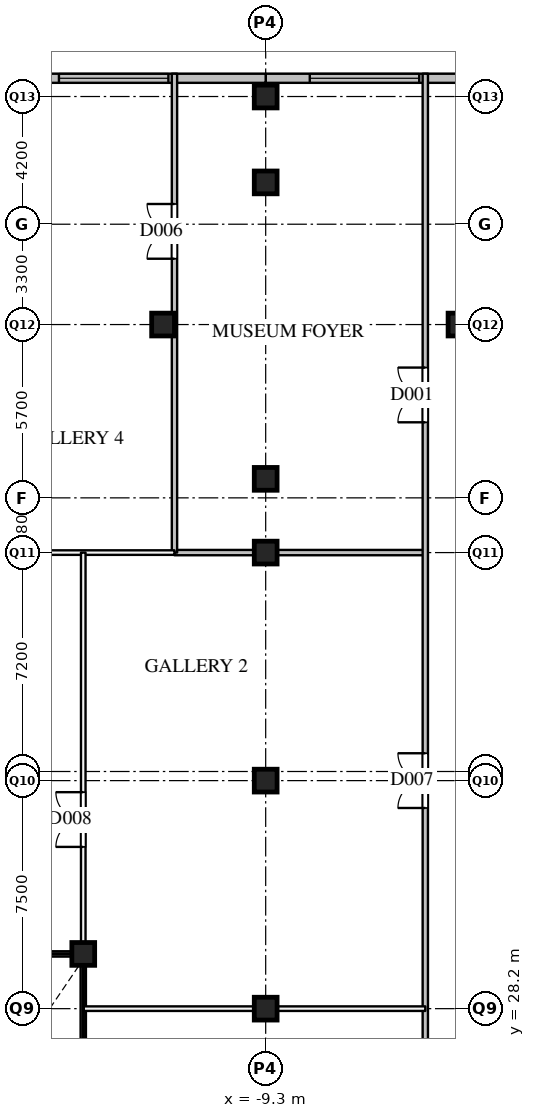
"""IFC4 building model, lengths in metres.
Left out: names, types, materials, properties, quantities, classifications, styles, units other than length and angle.
Written with IfcOpenShell. Run it as: python <this file> out.ifc"""

import sys

from ifc_helpers import new_model, si_unit, direction, frame, frame_2d, origin, origin_2d, place, context, subcontext, project, spatial, rectangle, extrude, element, fill, save


model = new_model("IFC4")
c1 = context("Model", 3, precision=1e-05, world=origin(), true_north=direction((0.0, 1.0)))
c2 = subcontext(c1, "Body", "Model", "MODEL_VIEW")
j1 = project(units=[si_unit("LENGTHUNIT", "METRE"), si_unit("PLANEANGLEUNIT", "RADIAN")], contexts=[c1])
p1 = place(None, origin())
s1 = spatial("IfcSite", under=j1, at=p1, CompositionType="ELEMENT")
p2 = place(p1, origin())
s2 = spatial("IfcBuilding", under=s1, at=p2, CompositionType="ELEMENT")
p3 = place(p2, origin())
s3 = spatial("IfcBuildingStorey", under=s2, at=p3, CompositionType="ELEMENT", Elevation=0.0)
for number, where, z_axis, x_axis in (
    (1, (-9.3, 28.2, 0.0), (0.0, 0.0, 1.0), (1.0, 0.0, 0.0)),
    (2, (-9.3, 35.7, 0.0), (0.0, 0.0, 1.0), (1.0, 0.0, 0.0)),
    (3, (-9.3, 43.2, 0.0), (0.0, 0.0, 1.0), (1.0, 0.0, 0.0)),
    (4, (-9.3, 58.2, 0.0), (0.0, 0.0, 1.0), (1.0, 0.0, 0.0)),
    (5, (-15.3, 30.0, 0.0), (0.0, 0.0, 1.0), (1.0, 0.0, 0.0)),
    (6, (-12.675, 50.7, 0.0), (0.0, 0.0, 1.0), (1.0, 0.0, 0.0)),
    (7, (-9.3, 45.625, 0.0), (0.0, 0.0, 1.0), (1.0, 0.0, 0.0)),
    (8, (-9.3, 55.375, 0.0), (0.0, 0.0, 1.0), (1.0, 0.0, 0.0)),
    (9, (-2.925, 50.7, 0.0), (0.0, 0.0, 1.0), (1.0, 0.0, 0.0)),
):
    element("IfcColumn", number, at=place(p3, frame(where, z_axis=z_axis, x_axis=x_axis)), inside=s3, PredefinedType="COLUMN", context=c2, shape_type="SweptSolid", body=[
        extrude(rectangle(XDim=0.75, YDim=0.75, at=origin_2d()), origin(), (0.0, 0.0, 1.0), 8.0),
    ])
p4 = place(p3, frame((-1.8, 58.8, 0.0), z_axis=(0.0, 0.0, 1.0), x_axis=(-1.0, 0.0, 0.0)))
e10 = element("IfcWall", 10, at=p4, inside=s3, PredefinedType="SOLIDWALL", context=c2, shape_type="SweptSolid", body=[
    extrude(rectangle(XDim=7.5, YDim=0.3, at=frame_2d((3.75, 0.0))), origin(), (0.0, 0.0, 1.0), 7.59),
])
p5 = place(p4, frame((2.45, 0.0, 0.9)))
e11 = element("IfcOpeningElement", 11, at=p5, cuts=e10, PredefinedType="OPENING", context=c2, shape_type="SweptSolid", body=[
    extrude(rectangle(XDim=3.6, YDim=3.0, at=frame_2d((1.8, 1.5))), frame((0.0, 0.16, 0.0), z_axis=(0.0, -1.0, 0.0), x_axis=(1.0, 0.0, 0.0)), (0.0, 0.0, 1.0), 0.32),
])
p6 = place(p3, frame((-9.3, 58.8, 0.0), z_axis=(0.0, 0.0, 1.0), x_axis=(-1.0, 0.0, 0.0)))
e12 = element("IfcWall", 12, at=p6, inside=s3, PredefinedType="SOLIDWALL", context=c2, shape_type="SweptSolid", body=[
    extrude(rectangle(XDim=7.5, YDim=0.3, at=frame_2d((3.75, 0.0))), origin(), (0.0, 0.0, 1.0), 7.59),
])
p7 = place(p6, frame((3.2, 0.0, 0.9)))
e13 = element("IfcOpeningElement", 13, at=p7, cuts=e12, PredefinedType="OPENING", context=c2, shape_type="SweptSolid", body=[
    extrude(rectangle(XDim=3.6, YDim=3.0, at=frame_2d((1.8, 1.5))), frame((0.0, 0.16, 0.0), z_axis=(0.0, -1.0, 0.0), x_axis=(1.0, 0.0, 0.0)), (0.0, 0.0, 1.0), 0.32),
])
p8 = place(p3, frame((-27.3, 30.0, 0.0), z_axis=(0.0, 0.0, 1.0), x_axis=(1.0, 0.0, 0.0)))
e14 = element("IfcWall", 14, at=p8, inside=s3, PredefinedType="PARTITIONING", context=c2, shape_type="SweptSolid", body=[
    extrude(rectangle(XDim=12.0, YDim=0.175, at=frame_2d((6.0, 0.0))), origin(), (0.0, 0.0, 1.0), 7.59),
])
p9 = place(p3, frame((-12.3, 43.2, 0.0), z_axis=(0.0, 0.0, 1.0), x_axis=(1.0, 0.0, 0.0)))
e15 = element("IfcWall", 15, at=p9, inside=s3, PredefinedType="PARTITIONING", context=c2, shape_type="SweptSolid", body=[
    extrude(rectangle(XDim=8.25, YDim=0.175, at=frame_2d((4.125, 0.0))), origin(), (0.0, 0.0, 1.0), 6.79),
])
p10 = place(p3, frame((-15.3, 12.0, 0.0), z_axis=(0.0, 0.0, 1.0), x_axis=(0.0, 1.0, 0.0)))
e16 = element("IfcWall", 16, at=p10, inside=s3, PredefinedType="PARTITIONING", context=c2, shape_type="SweptSolid", body=[
    extrude(rectangle(XDim=18.0, YDim=0.175, at=frame_2d((9.0, 0.0))), origin(), (0.0, 0.0, 1.0), 7.59),
])
p11 = place(p3, frame((-12.3, 43.2, 0.0), z_axis=(0.0, 0.0, 1.0), x_axis=(0.0, 1.0, 0.0)))
e17 = element("IfcWall", 17, at=p11, inside=s3, PredefinedType="PARTITIONING", context=c2, shape_type="SweptSolid", body=[
    extrude(rectangle(XDim=15.75, YDim=0.175, at=frame_2d((7.875, 0.0))), origin(), (0.0, 0.0, 1.0), 6.79),
])
p12 = place(p11, frame((9.665, 0.0, 0.0)))
e18 = element("IfcOpeningElement", 18, at=p12, cuts=e17, PredefinedType="OPENING", context=c2, shape_type="SweptSolid", body=[
    extrude(rectangle(XDim=1.8, YDim=2.1, at=frame_2d((0.9, 1.05))), frame((0.0, 0.097, 0.0), z_axis=(0.0, -1.0, 0.0), x_axis=(1.0, 0.0, 0.0)), (0.0, 0.0, 1.0), 0.195),
])
p13 = place(p3, frame((-4.05, -4.05, 0.0), z_axis=(0.0, 0.0, 1.0), x_axis=(0.0, 1.0, 0.0)))
e19 = element("IfcWall", 19, at=p13, inside=s3, PredefinedType="PARTITIONING", context=c2, shape_type="SweptSolid", body=[
    extrude(rectangle(XDim=63.0, YDim=0.175, at=frame_2d((31.5, 0.0))), origin(), (0.0, 0.0, 1.0), 6.79),
])
p14 = place(p13, frame((51.535, 0.0, 0.0)))
e20 = element("IfcOpeningElement", 20, at=p14, cuts=e19, PredefinedType="OPENING", context=c2, shape_type="SweptSolid", body=[
    extrude(rectangle(XDim=1.8, YDim=2.1, at=frame_2d((0.9, 1.05))), frame((0.0, 0.097, 0.0), z_axis=(0.0, -1.0, 0.0), x_axis=(1.0, 0.0, 0.0)), (0.0, 0.0, 1.0), 0.195),
])
p15 = place(p13, frame((23.25, 0.0, 0.0)))
e21 = element("IfcOpeningElement", 21, at=p15, cuts=e19, PredefinedType="OPENING", context=c2, shape_type="SweptSolid", body=[
    extrude(rectangle(XDim=1.8, YDim=2.1, at=frame_2d((0.9, 1.05))), frame((0.0, 0.097, 0.0), z_axis=(0.0, -1.0, 0.0), x_axis=(1.0, 0.0, 0.0)), (0.0, 0.0, 1.0), 0.195),
])
p16 = place(p13, frame((38.85, 0.0, 0.0)))
e22 = element("IfcOpeningElement", 22, at=p16, cuts=e19, PredefinedType="OPENING", context=c2, shape_type="SweptSolid", body=[
    extrude(rectangle(XDim=1.8, YDim=2.1, at=frame_2d((0.9, 1.05))), frame((0.0, 0.097, 0.0), z_axis=(0.0, -1.0, 0.0), x_axis=(1.0, 0.0, 0.0)), (0.0, 0.0, 1.0), 0.195),
])
p17 = place(p13, frame((8.625, 0.0, 0.0)))
e23 = element("IfcOpeningElement", 23, at=p17, cuts=e19, PredefinedType="OPENING", context=c2, shape_type="SweptSolid", body=[
    extrude(rectangle(XDim=1.8, YDim=2.1, at=frame_2d((0.9, 1.05))), frame((0.0, 0.097, 0.0), z_axis=(0.0, -1.0, 0.0), x_axis=(1.0, 0.0, 0.0)), (0.0, 0.0, 1.0), 0.195),
])
p18 = place(p3, frame((-15.3, 28.2, 0.0), z_axis=(0.0, 0.0, 1.0), x_axis=(1.0, 0.0, 0.0)))
e24 = element("IfcWall", 24, at=p18, inside=s3, PredefinedType="PARTITIONING", context=c2, shape_type="SweptSolid", body=[
    extrude(rectangle(XDim=11.25, YDim=0.15, at=frame_2d((5.625, 0.0))), origin(), (0.0, 0.0, 1.0), 6.79),
])
p19 = place(p3, frame((-27.3, 43.2, 0.0), z_axis=(0.0, 0.0, 1.0), x_axis=(1.0, 0.0, 0.0)))
e25 = element("IfcWall", 25, at=p19, inside=s3, PredefinedType="PARTITIONING", context=c2, shape_type="SweptSolid", body=[
    extrude(rectangle(XDim=15.0, YDim=0.15, at=frame_2d((7.5, 0.0))), origin(), (0.0, 0.0, 1.0), 6.79),
])
p20 = place(p3, frame((-15.3, 30.0, 0.0), z_axis=(0.0, 0.0, 1.0), x_axis=(0.0, 1.0, 0.0)))
e26 = element("IfcWall", 26, at=p20, inside=s3, PredefinedType="PARTITIONING", context=c2, shape_type="SweptSolid", body=[
    extrude(rectangle(XDim=13.2, YDim=0.15, at=frame_2d((6.6, 0.0))), origin(), (0.0, 0.0, 1.0), 6.79),
])
p21 = place(p20, frame((3.52, 0.0, 0.0)))
e27 = element("IfcOpeningElement", 27, at=p21, cuts=e26, PredefinedType="OPENING", context=c2, shape_type="SweptSolid", body=[
    extrude(rectangle(XDim=1.8, YDim=2.1, at=frame_2d((0.9, 1.05))), frame((0.0, 0.085, 0.0), z_axis=(0.0, -1.0, 0.0), x_axis=(1.0, 0.0, 0.0)), (0.0, 0.0, 1.0), 0.17),
])
p22 = place(p5, origin())
e28 = element("IfcWindow", 28, at=p22, inside=s3, PartitioningType="SINGLE_PANEL", PredefinedType="WINDOW", context=c2, shape_type="SweptSolid", body=[
    extrude(rectangle(XDim=3.6, YDim=3.0, at=frame_2d((1.8, 1.5))), frame((0.0, 0.03, 0.0), z_axis=(0.0, -1.0, 0.0), x_axis=(1.0, 0.0, 0.0)), (0.0, 0.0, 1.0), 0.06),
])
fill(e11, e28)
p23 = place(p7, origin())
e29 = element("IfcWindow", 29, at=p23, inside=s3, PartitioningType="SINGLE_PANEL", PredefinedType="WINDOW", context=c2, shape_type="SweptSolid", body=[
    extrude(rectangle(XDim=3.6, YDim=3.0, at=frame_2d((1.8, 1.5))), frame((0.0, 0.03, 0.0), z_axis=(0.0, -1.0, 0.0), x_axis=(1.0, 0.0, 0.0)), (0.0, 0.0, 1.0), 0.06),
])
fill(e13, e29)
p24 = place(p14, origin())
e30 = element("IfcDoor", 30, at=p24, inside=s3, OperationType="DOUBLE_DOOR_SINGLE_SWING", PredefinedType="DOOR", context=c2, shape_type="SweptSolid", body=[
    extrude(rectangle(XDim=1.8, YDim=2.1, at=frame_2d((0.9, 1.05))), frame((0.0, 0.025, 0.0), z_axis=(0.0, -1.0, 0.0), x_axis=(1.0, 0.0, 0.0)), (0.0, 0.0, 1.0), 0.05),
])
fill(e20, e30)
p25 = place(p12, origin())
e31 = element("IfcDoor", 31, at=p25, inside=s3, OperationType="DOUBLE_DOOR_SINGLE_SWING", PredefinedType="DOOR", context=c2, shape_type="SweptSolid", body=[
    extrude(rectangle(XDim=1.8, YDim=2.1, at=frame_2d((0.9, 1.05))), frame((0.0, 0.025, 0.0), z_axis=(0.0, -1.0, 0.0), x_axis=(1.0, 0.0, 0.0)), (0.0, 0.0, 1.0), 0.05),
])
fill(e18, e31)
p26 = place(p16, origin())
e32 = element("IfcDoor", 32, at=p26, inside=s3, OperationType="DOUBLE_DOOR_SINGLE_SWING", PredefinedType="DOOR", context=c2, shape_type="SweptSolid", body=[
    extrude(rectangle(XDim=1.8, YDim=2.1, at=frame_2d((0.9, 1.05))), frame((0.0, 0.025, 0.0), z_axis=(0.0, -1.0, 0.0), x_axis=(1.0, 0.0, 0.0)), (0.0, 0.0, 1.0), 0.05),
])
fill(e22, e32)
p27 = place(p21, origin())
e33 = element("IfcDoor", 33, at=p27, inside=s3, OperationType="DOUBLE_DOOR_SINGLE_SWING", PredefinedType="DOOR", context=c2, shape_type="SweptSolid", body=[
    extrude(rectangle(XDim=1.8, YDim=2.1, at=frame_2d((0.9, 1.05))), frame((0.0, 0.025, 0.0), z_axis=(0.0, -1.0, 0.0), x_axis=(1.0, 0.0, 0.0)), (0.0, 0.0, 1.0), 0.05),
])
fill(e27, e33)
save(model, sys.argv[1])
